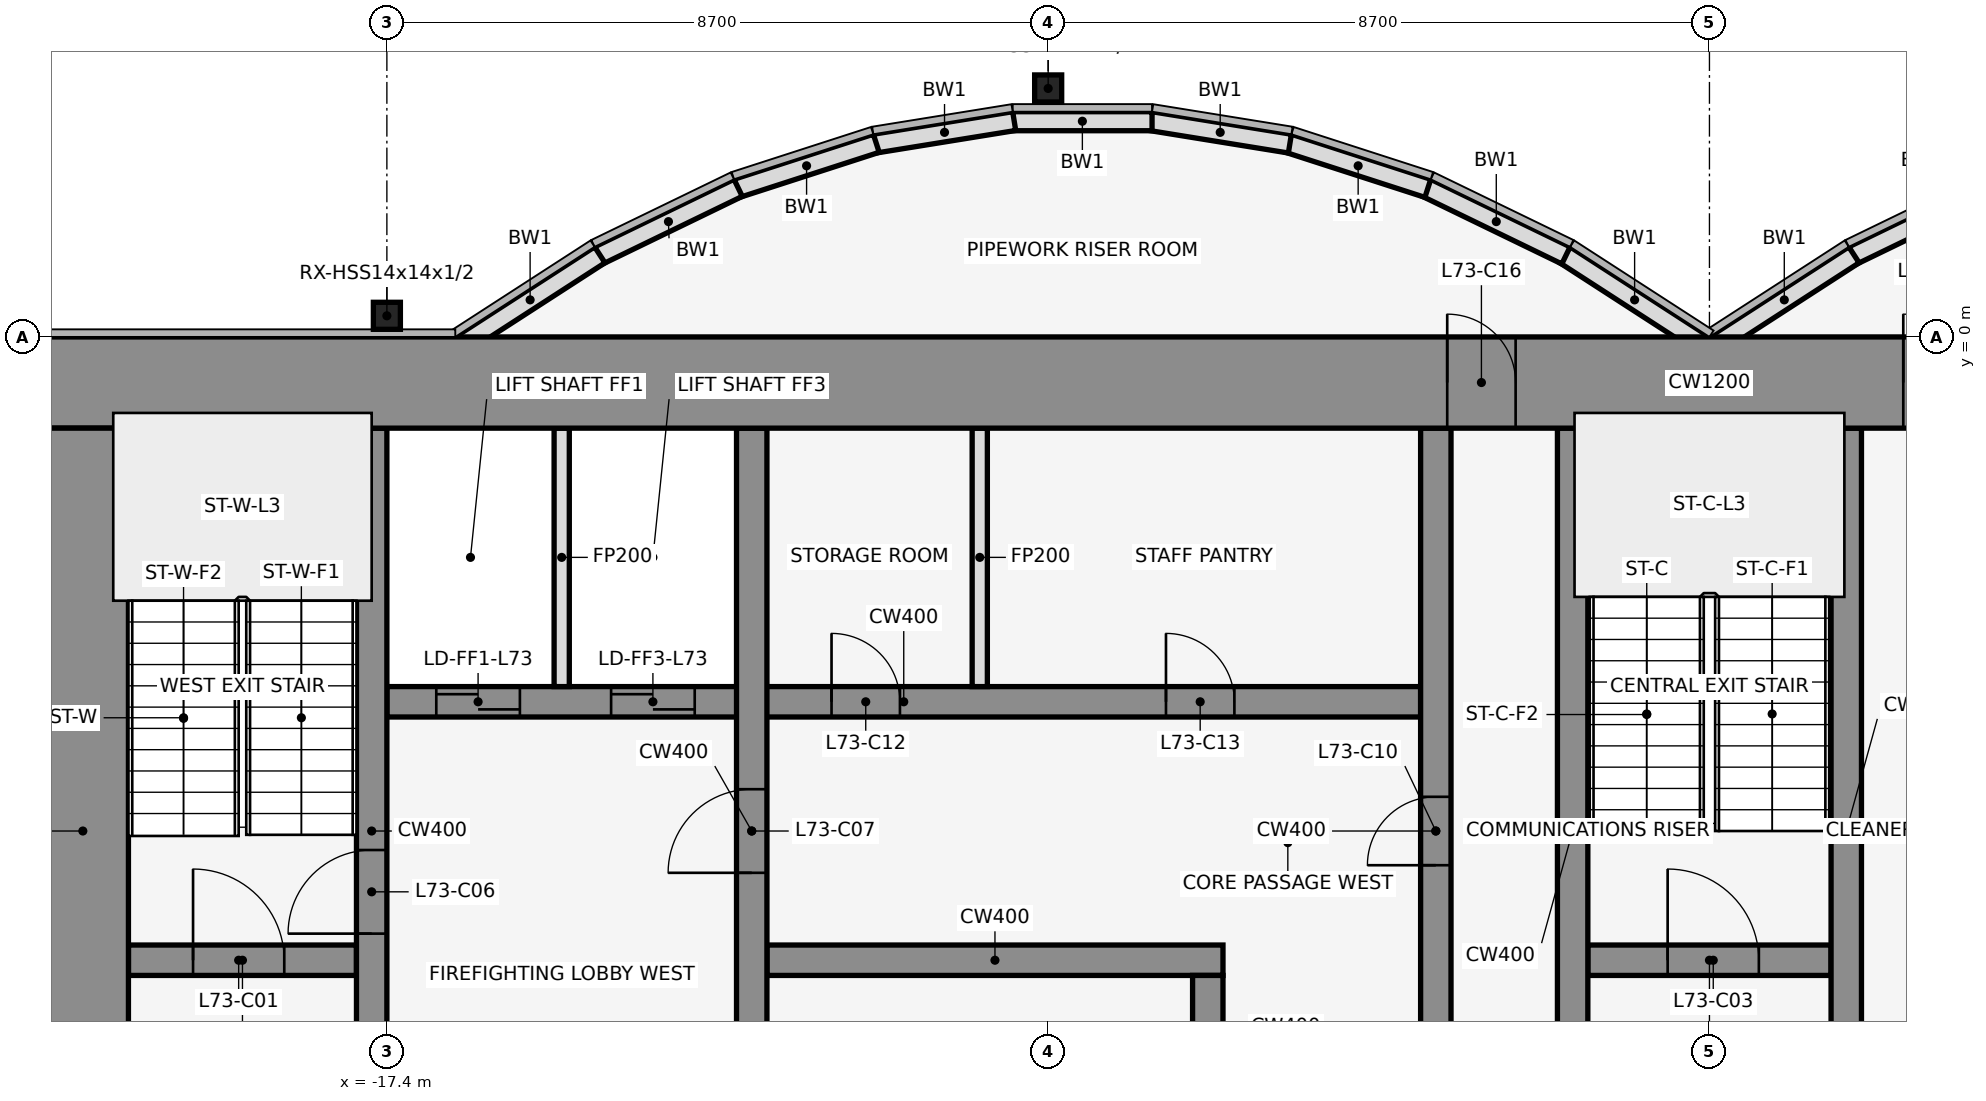
"""IFC4 building model, lengths in metres.
Left out: names, types, materials, properties, quantities, classifications, styles, units other than length and angle.
Written with IfcOpenShell. Run it as: python <this file> out.ifc"""

import sys

from ifc_helpers import new_model, si_unit, direction, frame, frame_2d, origin, origin_2d, place, context, subcontext, project, spatial, rectangle, hollow_rectangle, extrude, element, fill, save


model = new_model("IFC4")
c1 = context("Model", 3, precision=1e-05, world=origin(), true_north=direction((0.0, 1.0)))
c2 = subcontext(c1, "Body", "Model", "MODEL_VIEW")
j1 = project(units=[si_unit("LENGTHUNIT", "METRE"), si_unit("PLANEANGLEUNIT", "RADIAN")], contexts=[c1])
p1 = place(None, origin())
s1 = spatial("IfcSite", under=j1, at=p1, CompositionType="ELEMENT")
p2 = place(p1, origin())
s2 = spatial("IfcBuilding", under=s1, at=p2, CompositionType="ELEMENT")
p3 = place(p2, frame((0.0, 0.0, 324.5)))
s3 = spatial("IfcBuildingStorey", under=s2, at=p3, CompositionType="ELEMENT", Elevation=324.5)
for number, where, z_axis, x_axis in (
    (1, (-8.7, 3.269, 0.0), (0.0, 0.0, 1.0), (1.0, 0.0, 0.0)),
    (2, (-17.4, 0.278, 0.0), (0.0, 0.0, 1.0), (1.0, 0.0, 0.0)),
):
    element("IfcColumn", number, at=place(p3, frame(where, z_axis=z_axis, x_axis=x_axis)), inside=s3, PredefinedType="COLUMN", context=c2, shape_type="SweptSolid", body=[
        extrude(hollow_rectangle(XDim=0.356, YDim=0.356, WallThickness=0.012, at=origin_2d()), origin(), (0.0, 0.0, 1.0), 4.5),
    ])
p4 = place(p3, frame((3.721, 1.962, 0.0), z_axis=(0.0, 0.0, 1.0), x_axis=(-0.89982408427, -0.436252928206, 0.0)))
e3 = element("IfcWall", 3, at=p4, inside=s3, PredefinedType="STANDARD", context=c2, shape_type="SweptSolid", body=[
    extrude(rectangle(XDim=2.038, YDim=0.25, at=frame_2d((1.019, 0.0))), origin(), (0.0, 0.0, 1.0), 4.35),
])
for number, where, z_axis, x_axis in (
    (4, (1.901, 1.08, 0.0), (0.0, 0.0, 1.0), (-0.84, -0.543, 0.0)),
    (5, (-0.068, -0.105, 0.0), (0.0, 0.0, 1.0), (-0.84, 0.543, 0.0)),
):
    element("IfcWall", number, at=place(p3, frame(where, z_axis=z_axis, x_axis=x_axis)), inside=s3, PredefinedType="STANDARD", context=c2, shape_type="SweptSolid", body=[
        extrude(rectangle(XDim=2.183, YDim=0.25, at=frame_2d((1.091, 0.0))), origin(), (0.0, 0.0, 1.0), 4.35),
    ])
p5 = place(p3, frame((-1.888, 1.073, 0.0), z_axis=(0.0, 0.0, 1.0), x_axis=(-0.89982408427, 0.436252928206, 0.0)))
e6 = element("IfcWall", 6, at=p5, inside=s3, PredefinedType="STANDARD", context=c2, shape_type="SweptSolid", body=[
    extrude(rectangle(XDim=2.038, YDim=0.25, at=frame_2d((1.019, 0.0))), origin(), (0.0, 0.0, 1.0), 4.35),
])
p6 = place(p3, frame((-3.705, 1.955, 0.0), z_axis=(0.0, 0.0, 1.0), x_axis=(-0.951495806175, 0.307661714928, 0.0)))
e7 = element("IfcWall", 7, at=p6, inside=s3, PredefinedType="STANDARD", context=c2, shape_type="SweptSolid", body=[
    extrude(rectangle(XDim=1.927, YDim=0.25, at=frame_2d((0.963, 0.0))), origin(), (0.0, 0.0, 1.0), 4.35),
])
p7 = place(p3, frame((-5.52, 2.543, 0.0), z_axis=(0.0, 0.0, 1.0), x_axis=(-0.987181718931, 0.159600293885, 0.0)))
e8 = element("IfcWall", 8, at=p7, inside=s3, PredefinedType="STANDARD", context=c2, shape_type="SweptSolid", body=[
    extrude(rectangle(XDim=1.857, YDim=0.25, at=frame_2d((0.929, 0.0))), origin(), (0.0, 0.0, 1.0), 4.35),
])
p8 = place(p3, frame((-7.333, 2.838, 0.0), z_axis=(0.0, 0.0, 1.0), x_axis=(-1.0, 0.0, 0.0)))
e9 = element("IfcWall", 9, at=p8, inside=s3, PredefinedType="STANDARD", context=c2, shape_type="SweptSolid", body=[
    extrude(rectangle(XDim=1.833, YDim=0.25, at=frame_2d((0.917, 0.0))), origin(), (0.0, 0.0, 1.0), 4.35),
])
p9 = place(p3, frame((-9.147, 2.84, 0.0), z_axis=(0.0, 0.0, 1.0), x_axis=(-0.987181718931, -0.159600293885, 0.0)))
e10 = element("IfcWall", 10, at=p9, inside=s3, PredefinedType="STANDARD", context=c2, shape_type="SweptSolid", body=[
    extrude(rectangle(XDim=1.857, YDim=0.25, at=frame_2d((0.929, 0.0))), origin(), (0.0, 0.0, 1.0), 4.35),
])
p10 = place(p3, frame((-10.962, 2.548, 0.0), z_axis=(0.0, 0.0, 1.0), x_axis=(-0.951495806175, -0.307661714928, 0.0)))
e11 = element("IfcWall", 11, at=p10, inside=s3, PredefinedType="STANDARD", context=c2, shape_type="SweptSolid", body=[
    extrude(rectangle(XDim=1.927, YDim=0.25, at=frame_2d((0.963, 0.0))), origin(), (0.0, 0.0, 1.0), 4.35),
])
p11 = place(p3, frame((-12.779, 1.962, 0.0), z_axis=(0.0, 0.0, 1.0), x_axis=(-0.89982408427, -0.436252928206, 0.0)))
e12 = element("IfcWall", 12, at=p11, inside=s3, PredefinedType="STANDARD", context=c2, shape_type="SweptSolid", body=[
    extrude(rectangle(XDim=2.038, YDim=0.25, at=frame_2d((1.019, 0.0))), origin(), (0.0, 0.0, 1.0), 4.35),
])
p12 = place(p3, frame((-14.599, 1.08, 0.0), z_axis=(0.0, 0.0, 1.0), x_axis=(-0.83981312244, -0.542875602121, 0.0)))
e13 = element("IfcWall", 13, at=p12, inside=s3, PredefinedType="STANDARD", context=c2, shape_type="SweptSolid", body=[
    extrude(rectangle(XDim=2.183, YDim=0.25, at=frame_2d((1.091, 0.0))), origin(), (0.0, 0.0, 1.0), 4.35),
])
p13 = place(p3, frame((-20.8, -8.2, 0.0), z_axis=(0.0, 0.0, 1.0), x_axis=(1.0, 0.0, 0.0)))
e14 = element("IfcWall", 14, at=p13, inside=s3, PredefinedType="SHEAR", context=c2, shape_type="SweptSolid", body=[
    extrude(rectangle(XDim=3.0, YDim=0.4, at=frame_2d((1.5, 0.0))), origin(), (0.0, 0.0, 1.0), 4.5),
])
p14 = place(p13, frame((0.85, 0.0, 0.0)))
e15 = element("IfcOpeningElement", 15, at=p14, cuts=e14, PredefinedType="OPENING", context=c2, shape_type="SweptSolid", body=[
    extrude(rectangle(XDim=1.2, YDim=2.1, at=frame_2d((0.6, 1.05))), frame((0.0, 0.212, 0.0), z_axis=(0.0, -1.0, 0.0), x_axis=(1.0, 0.0, 0.0)), (0.0, 0.0, 1.0), 0.424),
])
p15 = place(p3, frame((-12.4, -8.2, 0.0), z_axis=(0.0, 0.0, 1.0), x_axis=(1.0, 0.0, 0.0)))
e16 = element("IfcWall", 16, at=p15, inside=s3, PredefinedType="SHEAR", context=c2, shape_type="SweptSolid", body=[
    extrude(rectangle(XDim=6.0, YDim=0.4, at=frame_2d((3.0, 0.0))), origin(), (0.0, 0.0, 1.0), 4.5),
])
p16 = place(p3, frame((-1.6, -8.2, 0.0), z_axis=(0.0, 0.0, 1.0), x_axis=(1.0, 0.0, 0.0)))
e17 = element("IfcWall", 17, at=p16, inside=s3, PredefinedType="SHEAR", context=c2, shape_type="SweptSolid", body=[
    extrude(rectangle(XDim=3.2, YDim=0.4, at=frame_2d((1.6, 0.0))), origin(), (0.0, 0.0, 1.0), 4.5),
])
p17 = place(p16, frame((1.05, 0.0, 0.0)))
e18 = element("IfcOpeningElement", 18, at=p17, cuts=e17, PredefinedType="OPENING", context=c2, shape_type="SweptSolid", body=[
    extrude(rectangle(XDim=1.2, YDim=2.1, at=frame_2d((0.6, 1.05))), frame((0.0, 0.212, 0.0), z_axis=(0.0, -1.0, 0.0), x_axis=(1.0, 0.0, 0.0)), (0.0, 0.0, 1.0), 0.424),
])
p18 = place(p3, frame((-17.4, -4.8, 0.0), z_axis=(0.0, 0.0, 1.0), x_axis=(1.0, 0.0, 0.0)))
e19 = element("IfcWall", 19, at=p18, inside=s3, PredefinedType="SHEAR", context=c2, shape_type="SweptSolid", body=[
    extrude(rectangle(XDim=13.6, YDim=0.4, at=frame_2d((6.8, 0.0))), origin(), (0.0, 0.0, 1.0), 4.5),
])
p19 = place(p18, frame((0.65, 0.0, 0.0)))
e20 = element("IfcOpeningElement", 20, at=p19, cuts=e19, PredefinedType="OPENING", context=c2, shape_type="SweptSolid", body=[
    extrude(rectangle(XDim=1.1, YDim=2.1, at=frame_2d((0.55, 1.05))), frame((0.0, 0.212, 0.0), z_axis=(0.0, -1.0, 0.0), x_axis=(1.0, 0.0, 0.0)), (0.0, 0.0, 1.0), 0.424),
])
p20 = place(p18, frame((2.95, 0.0, 0.0)))
e21 = element("IfcOpeningElement", 21, at=p20, cuts=e19, PredefinedType="OPENING", context=c2, shape_type="SweptSolid", body=[
    extrude(rectangle(XDim=1.1, YDim=2.1, at=frame_2d((0.55, 1.05))), frame((0.0, 0.212, 0.0), z_axis=(0.0, -1.0, 0.0), x_axis=(1.0, 0.0, 0.0)), (0.0, 0.0, 1.0), 0.424),
])
p21 = place(p18, frame((5.85, 0.0, 0.0)))
e22 = element("IfcOpeningElement", 22, at=p21, cuts=e19, PredefinedType="OPENING", context=c2, shape_type="SweptSolid", body=[
    extrude(rectangle(XDim=0.9, YDim=2.1, at=frame_2d((0.45, 1.05))), frame((0.0, 0.212, 0.0), z_axis=(0.0, -1.0, 0.0), x_axis=(1.0, 0.0, 0.0)), (0.0, 0.0, 1.0), 0.424),
])
p22 = place(p18, frame((10.25, 0.0, 0.0)))
e23 = element("IfcOpeningElement", 23, at=p22, cuts=e19, PredefinedType="OPENING", context=c2, shape_type="SweptSolid", body=[
    extrude(rectangle(XDim=0.9, YDim=2.1, at=frame_2d((0.45, 1.05))), frame((0.0, 0.212, 0.0), z_axis=(0.0, -1.0, 0.0), x_axis=(1.0, 0.0, 0.0)), (0.0, 0.0, 1.0), 0.424),
])
p23 = place(p3, frame((-17.6, -11.8, 0.0), z_axis=(0.0, 0.0, 1.0), x_axis=(0.0, 1.0, 0.0)))
e24 = element("IfcWall", 24, at=p23, inside=s3, PredefinedType="SHEAR", context=c2, shape_type="SweptSolid", body=[
    extrude(rectangle(XDim=10.6, YDim=0.4, at=frame_2d((5.3, 0.0))), origin(), (0.0, 0.0, 1.0), 4.5),
])
p24 = place(p23, frame((1.25, 0.0, 0.0)))
e25 = element("IfcOpeningElement", 25, at=p24, cuts=e24, PredefinedType="OPENING", context=c2, shape_type="SweptSolid", body=[
    extrude(rectangle(XDim=1.1, YDim=2.1, at=frame_2d((0.55, 1.05))), frame((0.0, 0.212, 0.0), z_axis=(0.0, -1.0, 0.0), x_axis=(1.0, 0.0, 0.0)), (0.0, 0.0, 1.0), 0.424),
])
p25 = place(p23, frame((3.95, 0.0, 0.0)))
e26 = element("IfcOpeningElement", 26, at=p25, cuts=e24, PredefinedType="OPENING", context=c2, shape_type="SweptSolid", body=[
    extrude(rectangle(XDim=1.1, YDim=2.1, at=frame_2d((0.55, 1.05))), frame((0.0, 0.212, 0.0), z_axis=(0.0, -1.0, 0.0), x_axis=(1.0, 0.0, 0.0)), (0.0, 0.0, 1.0), 0.424),
])
p26 = place(p3, frame((-15.1, -4.6, 0.0), z_axis=(0.0, 0.0, 1.0), x_axis=(0.0, 1.0, 0.0)))
e27 = element("IfcWall", 27, at=p26, inside=s3, PredefinedType="PARTITIONING", context=c2, shape_type="SweptSolid", body=[
    extrude(rectangle(XDim=3.4, YDim=0.2, at=frame_2d((1.7, 0.0))), origin(), (0.0, 0.0, 1.0), 3.418),
])
p27 = place(p3, frame((-12.6, -11.8, 0.0), z_axis=(0.0, 0.0, 1.0), x_axis=(0.0, 1.0, 0.0)))
e28 = element("IfcWall", 28, at=p27, inside=s3, PredefinedType="SHEAR", context=c2, shape_type="SweptSolid", body=[
    extrude(rectangle(XDim=10.6, YDim=0.4, at=frame_2d((5.3, 0.0))), origin(), (0.0, 0.0, 1.0), 4.5),
])
p28 = place(p27, frame((4.75, 0.0, 0.0)))
e29 = element("IfcOpeningElement", 29, at=p28, cuts=e28, PredefinedType="OPENING", context=c2, shape_type="SweptSolid", body=[
    extrude(rectangle(XDim=1.1, YDim=2.1, at=frame_2d((0.55, 1.05))), frame((0.0, 0.212, 0.0), z_axis=(0.0, -1.0, 0.0), x_axis=(1.0, 0.0, 0.0)), (0.0, 0.0, 1.0), 0.424),
])
p29 = place(p3, frame((-9.6, -4.6, 0.0), z_axis=(0.0, 0.0, 1.0), x_axis=(0.0, 1.0, 0.0)))
e30 = element("IfcWall", 30, at=p29, inside=s3, PredefinedType="PARTITIONING", context=c2, shape_type="SweptSolid", body=[
    extrude(rectangle(XDim=3.4, YDim=0.2, at=frame_2d((1.7, 0.0))), origin(), (0.0, 0.0, 1.0), 3.418),
])
p30 = place(p3, frame((-6.6, -11.8, 0.0), z_axis=(0.0, 0.0, 1.0), x_axis=(0.0, 1.0, 0.0)))
e31 = element("IfcWall", 31, at=p30, inside=s3, PredefinedType="SHEAR", context=c2, shape_type="SweptSolid", body=[
    extrude(rectangle(XDim=3.4, YDim=0.4, at=frame_2d((1.7, 0.0))), origin(), (0.0, 0.0, 1.0), 4.5),
])
p31 = place(p30, frame((1.25, 0.0, 0.0)))
e32 = element("IfcOpeningElement", 32, at=p31, cuts=e31, PredefinedType="OPENING", context=c2, shape_type="SweptSolid", body=[
    extrude(rectangle(XDim=0.9, YDim=2.1, at=frame_2d((0.45, 1.05))), frame((0.0, 0.212, 0.0), z_axis=(0.0, -1.0, 0.0), x_axis=(1.0, 0.0, 0.0)), (0.0, 0.0, 1.0), 0.424),
])
p32 = place(p3, frame((-3.6, -11.8, 0.0), z_axis=(0.0, 0.0, 1.0), x_axis=(0.0, 1.0, 0.0)))
e33 = element("IfcWall", 33, at=p32, inside=s3, PredefinedType="SHEAR", context=c2, shape_type="SweptSolid", body=[
    extrude(rectangle(XDim=10.6, YDim=0.4, at=frame_2d((5.3, 0.0))), origin(), (0.0, 0.0, 1.0), 4.5),
])
p33 = place(p32, frame((4.85, 0.0, 0.0)))
e34 = element("IfcOpeningElement", 34, at=p33, cuts=e33, PredefinedType="OPENING", context=c2, shape_type="SweptSolid", body=[
    extrude(rectangle(XDim=0.9, YDim=2.1, at=frame_2d((0.45, 1.05))), frame((0.0, 0.212, 0.0), z_axis=(0.0, -1.0, 0.0), x_axis=(1.0, 0.0, 0.0)), (0.0, 0.0, 1.0), 0.424),
])
for number, where, z_axis, x_axis in (
    (35, (-1.8, -11.8, 0.0), (0.0, 0.0, 1.0), (0.0, 1.0, 0.0)),
    (36, (1.8, -11.8, 0.0), (0.0, 0.0, 1.0), (0.0, 1.0, 0.0)),
):
    element("IfcWall", number, at=place(p3, frame(where, z_axis=z_axis, x_axis=x_axis)), inside=s3, PredefinedType="SHEAR", context=c2, shape_type="SweptSolid", body=[
        extrude(rectangle(XDim=10.6, YDim=0.4, at=frame_2d((5.3, 0.0))), origin(), (0.0, 0.0, 1.0), 4.5),
    ])
p34 = place(p3, frame((-22.0, -0.6, 0.0), z_axis=(0.0, 0.0, 1.0), x_axis=(1.0, 0.0, 0.0)))
e37 = element("IfcWall", 37, at=p34, inside=s3, PredefinedType="SHEAR", context=c2, shape_type="SweptSolid", body=[
    extrude(rectangle(XDim=44.0, YDim=1.2, at=frame_2d((22.0, 0.0))), origin(), (0.0, 0.0, 1.0), 4.5),
])
p35 = place(p34, frame((18.55, 0.0, 0.0)))
e38 = element("IfcOpeningElement", 38, at=p35, cuts=e37, PredefinedType="OPENING", context=c2, shape_type="SweptSolid", body=[
    extrude(rectangle(XDim=0.9, YDim=2.1, at=frame_2d((0.45, 1.05))), frame((0.0, 0.612, 0.0), z_axis=(0.0, -1.0, 0.0), x_axis=(1.0, 0.0, 0.0)), (0.0, 0.0, 1.0), 1.224),
])
p36 = place(p34, frame((24.55, 0.0, 0.0)))
e39 = element("IfcOpeningElement", 39, at=p36, cuts=e37, PredefinedType="OPENING", context=c2, shape_type="SweptSolid", body=[
    extrude(rectangle(XDim=0.9, YDim=2.1, at=frame_2d((0.45, 1.05))), frame((0.0, 0.612, 0.0), z_axis=(0.0, -1.0, 0.0), x_axis=(1.0, 0.0, 0.0)), (0.0, 0.0, 1.0), 1.224),
])
p37 = place(p3, frame((-21.4, -11.8, 0.0), z_axis=(0.0, 0.0, 1.0), x_axis=(0.0, 1.0, 0.0)))
e40 = element("IfcWall", 40, at=p37, inside=s3, PredefinedType="SHEAR", context=c2, shape_type="SweptSolid", body=[
    extrude(rectangle(XDim=10.6, YDim=1.2, at=frame_2d((5.3, 0.0))), origin(), (0.0, 0.0, 1.0), 4.5),
])
p38 = place(p14, origin())
e41 = element("IfcDoor", 41, at=p38, inside=s3, OperationType="SINGLE_SWING_LEFT", PredefinedType="DOOR", context=c2, shape_type="SweptSolid", body=[
    extrude(rectangle(XDim=1.2, YDim=2.1, at=frame_2d((0.6, 1.05))), frame((0.0, 0.025, 0.0), z_axis=(0.0, -1.0, 0.0), x_axis=(1.0, 0.0, 0.0)), (0.0, 0.0, 1.0), 0.05),
])
fill(e15, e41)
p39 = place(p17, origin())
e42 = element("IfcDoor", 42, at=p39, inside=s3, OperationType="SINGLE_SWING_LEFT", PredefinedType="DOOR", context=c2, shape_type="SweptSolid", body=[
    extrude(rectangle(XDim=1.2, YDim=2.1, at=frame_2d((0.6, 1.05))), frame((0.0, 0.025, 0.0), z_axis=(0.0, -1.0, 0.0), x_axis=(1.0, 0.0, 0.0)), (0.0, 0.0, 1.0), 0.05),
])
fill(e18, e42)
p40 = place(p19, origin())
e43 = element("IfcDoor", 43, at=p40, inside=s3, OperationType="DOUBLE_DOOR_SLIDING", PredefinedType="DOOR", context=c2, shape_type="SweptSolid", body=[
    extrude(rectangle(XDim=1.1, YDim=2.1, at=frame_2d((0.55, 1.05))), frame((0.0, 0.025, 0.0), z_axis=(0.0, -1.0, 0.0), x_axis=(1.0, 0.0, 0.0)), (0.0, 0.0, 1.0), 0.05),
])
fill(e20, e43)
p41 = place(p20, origin())
e44 = element("IfcDoor", 44, at=p41, inside=s3, OperationType="DOUBLE_DOOR_SLIDING", PredefinedType="DOOR", context=c2, shape_type="SweptSolid", body=[
    extrude(rectangle(XDim=1.1, YDim=2.1, at=frame_2d((0.55, 1.05))), frame((0.0, 0.025, 0.0), z_axis=(0.0, -1.0, 0.0), x_axis=(1.0, 0.0, 0.0)), (0.0, 0.0, 1.0), 0.05),
])
fill(e21, e44)
p42 = place(p25, frame((1.1, 0.0, 0.0), z_axis=(0.0, 0.0, 1.0), x_axis=(-1.0, 0.0, 0.0)))
e45 = element("IfcDoor", 45, at=p42, inside=s3, OperationType="SINGLE_SWING_LEFT", PredefinedType="DOOR", context=c2, shape_type="SweptSolid", body=[
    extrude(rectangle(XDim=1.1, YDim=2.1, at=frame_2d((0.55, 1.05))), frame((0.0, 0.025, 0.0), z_axis=(0.0, -1.0, 0.0), x_axis=(1.0, 0.0, 0.0)), (0.0, 0.0, 1.0), 0.05),
])
fill(e26, e45)
p43 = place(p28, origin())
e46 = element("IfcDoor", 46, at=p43, inside=s3, OperationType="SINGLE_SWING_LEFT", PredefinedType="DOOR", context=c2, shape_type="SweptSolid", body=[
    extrude(rectangle(XDim=1.1, YDim=2.1, at=frame_2d((0.55, 1.05))), frame((0.0, 0.025, 0.0), z_axis=(0.0, -1.0, 0.0), x_axis=(1.0, 0.0, 0.0)), (0.0, 0.0, 1.0), 0.05),
])
fill(e29, e46)
p44 = place(p33, frame((0.9, 0.0, 0.0), z_axis=(0.0, 0.0, 1.0), x_axis=(-1.0, 0.0, 0.0)))
e47 = element("IfcDoor", 47, at=p44, inside=s3, OperationType="SINGLE_SWING_LEFT", PredefinedType="DOOR", context=c2, shape_type="SweptSolid", body=[
    extrude(rectangle(XDim=0.9, YDim=2.1, at=frame_2d((0.45, 1.05))), frame((0.0, 0.025, 0.0), z_axis=(0.0, -1.0, 0.0), x_axis=(1.0, 0.0, 0.0)), (0.0, 0.0, 1.0), 0.05),
])
fill(e34, e47)
p45 = place(p21, origin())
e48 = element("IfcDoor", 48, at=p45, inside=s3, OperationType="SINGLE_SWING_RIGHT", PredefinedType="DOOR", context=c2, shape_type="SweptSolid", body=[
    extrude(rectangle(XDim=0.9, YDim=2.1, at=frame_2d((0.45, 1.05))), frame((0.0, 0.025, 0.0), z_axis=(0.0, -1.0, 0.0), x_axis=(1.0, 0.0, 0.0)), (0.0, 0.0, 1.0), 0.05),
])
fill(e22, e48)
p46 = place(p22, origin())
e49 = element("IfcDoor", 49, at=p46, inside=s3, OperationType="SINGLE_SWING_LEFT", PredefinedType="DOOR", context=c2, shape_type="SweptSolid", body=[
    extrude(rectangle(XDim=0.9, YDim=2.1, at=frame_2d((0.45, 1.05))), frame((0.0, 0.025, 0.0), z_axis=(0.0, -1.0, 0.0), x_axis=(1.0, 0.0, 0.0)), (0.0, 0.0, 1.0), 0.05),
])
fill(e23, e49)
p47 = place(p35, origin())
e50 = element("IfcDoor", 50, at=p47, inside=s3, OperationType="SINGLE_SWING_LEFT", PredefinedType="DOOR", context=c2, shape_type="SweptSolid", body=[
    extrude(rectangle(XDim=0.9, YDim=2.1, at=frame_2d((0.45, 1.05))), frame((0.0, 0.025, 0.0), z_axis=(0.0, -1.0, 0.0), x_axis=(1.0, 0.0, 0.0)), (0.0, 0.0, 1.0), 0.05),
])
fill(e38, e50)
p48 = place(p36, origin())
e51 = element("IfcDoor", 51, at=p48, inside=s3, OperationType="SINGLE_SWING_LEFT", PredefinedType="DOOR", context=c2, shape_type="SweptSolid", body=[
    extrude(rectangle(XDim=0.9, YDim=2.1, at=frame_2d((0.45, 1.05))), frame((0.0, 0.025, 0.0), z_axis=(0.0, -1.0, 0.0), x_axis=(1.0, 0.0, 0.0)), (0.0, 0.0, 1.0), 0.05),
])
fill(e39, e51)
save(model, sys.argv[1])
